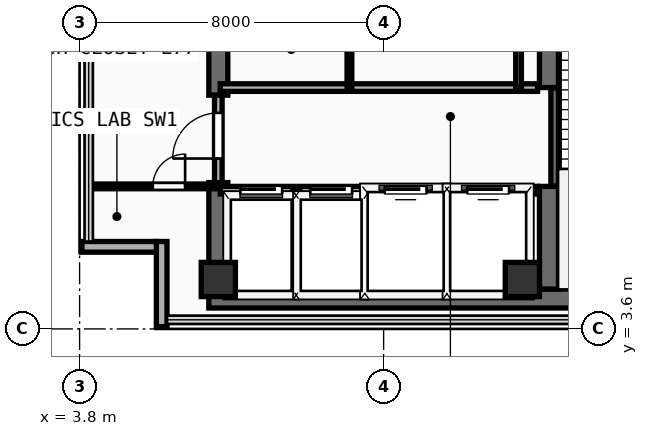
"""IFC4 building model, lengths in metres.
Left out: names, types, materials, properties, quantities, classifications, styles, units other than length and angle.
Written with IfcOpenShell. Run it as: python <this file> out.ifc"""

import sys

from ifc_helpers import new_model, si_unit, direction, frame, frame_2d, origin, origin_2d, place, context, subcontext, project, spatial, rectangle, extrude, element, fill, save


model = new_model("IFC4")
c1 = context("Model", 3, precision=1e-05, world=origin(), true_north=direction((0.0, 1.0)))
c2 = subcontext(c1, "Body", "Model", "MODEL_VIEW")
j1 = project(units=[si_unit("LENGTHUNIT", "METRE"), si_unit("PLANEANGLEUNIT", "RADIAN")], contexts=[c1])
p1 = place(None, origin())
s1 = spatial("IfcSite", under=j1, at=p1, CompositionType="ELEMENT")
p2 = place(p1, origin())
s2 = spatial("IfcBuilding", under=s1, at=p2, CompositionType="ELEMENT")
p3 = place(p2, frame((0.0, 0.0, 300.8)))
s3 = spatial("IfcBuildingStorey", under=s2, at=p3, CompositionType="ELEMENT", Elevation=300.8)
p4 = place(p3, frame((7.2, 4.4, 0.0), z_axis=(0.0, 0.0, 1.0), x_axis=(1.0, 0.0, 0.0)))
e1 = element("IfcWall", 1, at=p4, inside=s3, PredefinedType="SHEAR", context=c2, shape_type="SweptSolid", body=[
    extrude(rectangle(XDim=13.85, YDim=0.5, at=frame_2d((6.925, 0.0))), origin(), (0.0, 0.0, 1.0), 3.56),
])
p5 = place(p3, frame((7.45, 4.65, 0.0), z_axis=(0.0, 0.0, 1.0), x_axis=(0.0, 1.0, 0.0)))
e2 = element("IfcWall", 2, at=p5, inside=s3, PredefinedType="SHEAR", context=c2, shape_type="SweptSolid", body=[
    extrude(rectangle(XDim=2.8, YDim=0.5, at=frame_2d((1.4, 0.0))), origin(), (0.0, 0.0, 1.0), 3.56),
])
p6 = place(p3, frame((7.45, 9.75, 0.0), z_axis=(0.0, 0.0, 1.0), x_axis=(0.0, 1.0, 0.0)))
e3 = element("IfcWall", 3, at=p6, inside=s3, PredefinedType="SHEAR", context=c2, shape_type="SweptSolid", body=[
    extrude(rectangle(XDim=2.4, YDim=0.5, at=frame_2d((1.2, 0.0))), origin(), (0.0, 0.0, 1.0), 3.56),
])
p7 = place(p3, frame((16.15, 4.65, 0.0), z_axis=(0.0, 0.0, 1.0), x_axis=(0.0, 1.0, 0.0)))
e4 = element("IfcWall", 4, at=p7, inside=s3, PredefinedType="SHEAR", context=c2, shape_type="SweptSolid", body=[
    extrude(rectangle(XDim=2.7, YDim=0.5, at=frame_2d((1.35, 0.0))), origin(), (0.0, 0.0, 1.0), 3.56),
])
p8 = place(p3, frame((16.15, 9.95, 0.0), z_axis=(0.0, 0.0, 1.0), x_axis=(0.0, 1.0, 0.0)))
e5 = element("IfcWall", 5, at=p8, inside=s3, PredefinedType="SHEAR", context=c2, shape_type="SweptSolid", body=[
    extrude(rectangle(XDim=2.15, YDim=0.5, at=frame_2d((1.075, 0.0))), origin(), (0.0, 0.0, 1.0), 3.56),
])
for number, where, z_axis, x_axis in (
    (6, (7.45, 4.9, 0.0), (0.0, 0.0, 1.0), (1.0, 0.0, 0.0)),
    (7, (15.45, 4.9, 0.0), (0.0, 0.0, 1.0), (1.0, 0.0, 0.0)),
):
    element("IfcColumn", number, at=place(p3, frame(where, z_axis=z_axis, x_axis=x_axis)), inside=s3, PredefinedType="COLUMN", context=c2, shape_type="SweptSolid", body=[
        extrude(rectangle(XDim=0.9, YDim=0.9, at=origin_2d()), origin(), (0.0, 0.0, 1.0), 3.56),
    ])
p9 = place(p3, frame((5.96, 3.66, 0.0), z_axis=(0.0, 0.0, 1.0), x_axis=(0.0, 1.0, 0.0)))
e8 = element("IfcWall", 8, at=p9, inside=s3, PredefinedType="SOLIDWALL", context=c2, shape_type="SweptSolid", body=[
    extrude(rectangle(XDim=2.24, YDim=0.28, at=frame_2d((1.12, 0.0))), origin(), (0.0, 0.0, 1.0), 3.56),
])
p10 = place(p3, frame((3.86, 5.76, 0.0), z_axis=(0.0, 0.0, 1.0), x_axis=(1.0, 0.0, 0.0)))
e9 = element("IfcWall", 9, at=p10, inside=s3, PredefinedType="SOLIDWALL", context=c2, shape_type="SweptSolid", body=[
    extrude(rectangle(XDim=1.96, YDim=0.28, at=frame_2d((0.98, 0.0))), origin(), (0.0, 0.0, 1.0), 3.56),
])
p11 = place(p3, frame((16.3, 7.36, 0.0), z_axis=(0.0, 0.0, 1.0), x_axis=(0.0, 1.0, 0.0)))
e10 = element("IfcWall", 10, at=p11, inside=s3, PredefinedType="SHEAR", context=c2, shape_type="SweptSolid", body=[
    extrude(rectangle(XDim=2.58, YDim=0.2, at=frame_2d((1.29, 0.0))), origin(), (0.0, 0.0, 1.0), 3.56),
])
p12 = place(p3, frame((7.5, 7.25, 0.0), z_axis=(0.0, 0.0, 1.0), x_axis=(1.0, 0.0, 0.0)))
e11 = element("IfcWall", 11, at=p12, inside=s3, PredefinedType="PARTITIONING", context=c2, shape_type="SweptSolid", body=[
    extrude(rectangle(XDim=8.35, YDim=0.2, at=frame_2d((4.175, 0.0))), origin(), (0.0, 0.0, 1.0), 3.56),
])
p13 = place(p12, frame((0.53, 0.0, 0.0)))
e12 = element("IfcOpeningElement", 12, at=p13, cuts=e11, PredefinedType="OPENING", context=c2, shape_type="SweptSolid", body=[
    extrude(rectangle(XDim=1.1, YDim=2.2, at=frame_2d((0.55, 1.1))), frame((0.0, 0.11, 0.0), z_axis=(0.0, -1.0, 0.0), x_axis=(1.0, 0.0, 0.0)), (0.0, 0.0, 1.0), 0.22),
])
p14 = place(p12, frame((2.37, 0.0, 0.0)))
e13 = element("IfcOpeningElement", 13, at=p14, cuts=e11, PredefinedType="OPENING", context=c2, shape_type="SweptSolid", body=[
    extrude(rectangle(XDim=1.1, YDim=2.2, at=frame_2d((0.55, 1.1))), frame((0.0, 0.11, 0.0), z_axis=(0.0, -1.0, 0.0), x_axis=(1.0, 0.0, 0.0)), (0.0, 0.0, 1.0), 0.22),
])
p15 = place(p12, frame((4.33, 0.0, 0.0)))
e14 = element("IfcOpeningElement", 14, at=p15, cuts=e11, PredefinedType="OPENING", context=c2, shape_type="SweptSolid", body=[
    extrude(rectangle(XDim=1.1, YDim=2.2, at=frame_2d((0.55, 1.1))), frame((0.0, 0.11, 0.0), z_axis=(0.0, -1.0, 0.0), x_axis=(1.0, 0.0, 0.0)), (0.0, 0.0, 1.0), 0.22),
])
p16 = place(p12, frame((6.5, 0.0, 0.0)))
e15 = element("IfcOpeningElement", 15, at=p16, cuts=e11, PredefinedType="OPENING", context=c2, shape_type="SweptSolid", body=[
    extrude(rectangle(XDim=1.1, YDim=2.2, at=frame_2d((0.55, 1.1))), frame((0.0, 0.11, 0.0), z_axis=(0.0, -1.0, 0.0), x_axis=(1.0, 0.0, 0.0)), (0.0, 0.0, 1.0), 0.22),
])
p17 = place(p3, frame((7.5, 9.95, 0.0), z_axis=(0.0, 0.0, 1.0), x_axis=(1.0, 0.0, 0.0)))
e16 = element("IfcWall", 16, at=p17, inside=s3, PredefinedType="PARTITIONING", context=c2, shape_type="SweptSolid", body=[
    extrude(rectangle(XDim=8.35, YDim=0.2, at=frame_2d((4.175, 0.0))), origin(), (0.0, 0.0, 1.0), 3.56),
])
for number, where, z_axis, x_axis in (
    (17, (9.5, 4.45, 0.0), (0.0, 0.0, 1.0), (0.0, 1.0, 0.0)),
    (18, (11.36, 4.45, 0.0), (0.0, 0.0, 1.0), (0.0, 1.0, 0.0)),
    (19, (13.46, 4.45, 0.0), (0.0, 0.0, 1.0), (0.0, 1.0, 0.0)),
):
    element("IfcWall", number, at=place(p3, frame(where, z_axis=z_axis, x_axis=x_axis)), inside=s3, PredefinedType="PARTITIONING", context=c2, shape_type="SweptSolid", body=[
        extrude(rectangle(XDim=2.8, YDim=0.2, at=frame_2d((1.4, 0.0))), origin(), (0.0, 0.0, 1.0), 3.56),
    ])
p18 = place(p3, frame((7.45, 7.45, 0.0), z_axis=(0.0, 0.0, 1.0), x_axis=(0.0, 1.0, 0.0)))
e20 = element("IfcWall", 20, at=p18, inside=s3, PredefinedType="PARTITIONING", context=c2, shape_type="SweptSolid", body=[
    extrude(rectangle(XDim=2.3, YDim=0.2, at=frame_2d((1.15, 0.0))), origin(), (0.0, 0.0, 1.0), 2.54),
])
p19 = place(p18, frame((0.633, 0.0, 0.0)))
e21 = element("IfcOpeningElement", 21, at=p19, cuts=e20, PredefinedType="OPENING", context=c2, shape_type="SweptSolid", body=[
    extrude(rectangle(XDim=1.2, YDim=2.25, at=frame_2d((0.6, 1.125))), frame((0.0, 0.11, 0.0), z_axis=(0.0, -1.0, 0.0), x_axis=(1.0, 0.0, 0.0)), (0.0, 0.0, 1.0), 0.22),
])
p20 = place(p3, frame((15.35, 9.95, 0.0), z_axis=(0.0, 0.0, 1.0), x_axis=(0.0, 1.0, 0.0)))
e22 = element("IfcWall", 22, at=p20, inside=s3, PredefinedType="PARTITIONING", context=c2, shape_type="SweptSolid", body=[
    extrude(rectangle(XDim=2.41, YDim=0.15, at=frame_2d((1.205, 0.0))), origin(), (0.0, 0.0, 1.0), 3.56),
])
p21 = place(p3, frame((10.9, 9.95, 0.0), z_axis=(0.0, 0.0, 1.0), x_axis=(0.0, 1.0, 0.0)))
e23 = element("IfcWall", 23, at=p21, inside=s3, PredefinedType="PARTITIONING", context=c2, shape_type="SweptSolid", body=[
    extrude(rectangle(XDim=2.41, YDim=0.125, at=frame_2d((1.205, 0.0))), origin(), (0.0, 0.0, 1.0), 3.56),
])
p22 = place(p3, frame((4.04, 7.35, 0.0), z_axis=(0.0, 0.0, 1.0), x_axis=(1.0, 0.0, 0.0)))
e24 = element("IfcWall", 24, at=p22, inside=s3, PredefinedType="PARTITIONING", context=c2, shape_type="SweptSolid", body=[
    extrude(rectangle(XDim=3.36, YDim=0.125, at=frame_2d((1.68, 0.0))), origin(), (0.0, 0.0, 1.0), 3.56),
])
p23 = place(p22, frame((1.687, 0.0, 0.0)))
e25 = element("IfcOpeningElement", 25, at=p23, cuts=e24, PredefinedType="OPENING", context=c2, shape_type="SweptSolid", body=[
    extrude(rectangle(XDim=0.85, YDim=2.15, at=frame_2d((0.425, 1.075))), frame((0.0, 0.073, 0.0), z_axis=(0.0, -1.0, 0.0), x_axis=(1.0, 0.0, 0.0)), (0.0, 0.0, 1.0), 0.145),
])
p24 = place(p13, origin())
e26 = element("IfcDoor", 26, at=p24, inside=s3, OperationType="SLIDING_TO_LEFT", PredefinedType="DOOR", context=c2, shape_type="SweptSolid", body=[
    extrude(rectangle(XDim=1.1, YDim=2.2, at=frame_2d((0.55, 1.1))), frame((0.0, 0.025, 0.0), z_axis=(0.0, -1.0, 0.0), x_axis=(1.0, 0.0, 0.0)), (0.0, 0.0, 1.0), 0.05),
])
fill(e12, e26)
p25 = place(p14, origin())
e27 = element("IfcDoor", 27, at=p25, inside=s3, OperationType="SLIDING_TO_LEFT", PredefinedType="DOOR", context=c2, shape_type="SweptSolid", body=[
    extrude(rectangle(XDim=1.1, YDim=2.2, at=frame_2d((0.55, 1.1))), frame((0.0, 0.025, 0.0), z_axis=(0.0, -1.0, 0.0), x_axis=(1.0, 0.0, 0.0)), (0.0, 0.0, 1.0), 0.05),
])
fill(e13, e27)
p26 = place(p15, origin())
e28 = element("IfcDoor", 28, at=p26, inside=s3, OperationType="SLIDING_TO_LEFT", PredefinedType="DOOR", context=c2, shape_type="SweptSolid", body=[
    extrude(rectangle(XDim=1.1, YDim=2.2, at=frame_2d((0.55, 1.1))), frame((0.0, 0.025, 0.0), z_axis=(0.0, -1.0, 0.0), x_axis=(1.0, 0.0, 0.0)), (0.0, 0.0, 1.0), 0.05),
])
fill(e14, e28)
p27 = place(p16, origin())
e29 = element("IfcDoor", 29, at=p27, inside=s3, OperationType="SLIDING_TO_LEFT", PredefinedType="DOOR", context=c2, shape_type="SweptSolid", body=[
    extrude(rectangle(XDim=1.1, YDim=2.2, at=frame_2d((0.55, 1.1))), frame((0.0, 0.025, 0.0), z_axis=(0.0, -1.0, 0.0), x_axis=(1.0, 0.0, 0.0)), (0.0, 0.0, 1.0), 0.05),
])
fill(e15, e29)
p28 = place(p19, frame((1.2, 0.0, 0.0), z_axis=(0.0, 0.0, 1.0), x_axis=(-1.0, 0.0, 0.0)))
e30 = element("IfcDoor", 30, at=p28, inside=s3, OperationType="SINGLE_SWING_RIGHT", PredefinedType="DOOR", context=c2, shape_type="SweptSolid", body=[
    extrude(rectangle(XDim=1.2, YDim=2.25, at=frame_2d((0.6, 1.125))), frame((0.0, 0.025, 0.0), z_axis=(0.0, -1.0, 0.0), x_axis=(1.0, 0.0, 0.0)), (0.0, 0.0, 1.0), 0.05),
])
fill(e21, e30)
p29 = place(p23, origin())
e31 = element("IfcDoor", 31, at=p29, inside=s3, OperationType="SINGLE_SWING_RIGHT", PredefinedType="DOOR", context=c2, shape_type="SweptSolid", body=[
    extrude(rectangle(XDim=0.85, YDim=2.15, at=frame_2d((0.425, 1.075))), frame((0.0, 0.025, 0.0), z_axis=(0.0, -1.0, 0.0), x_axis=(1.0, 0.0, 0.0)), (0.0, 0.0, 1.0), 0.05),
])
fill(e25, e31)
save(model, sys.argv[1])
